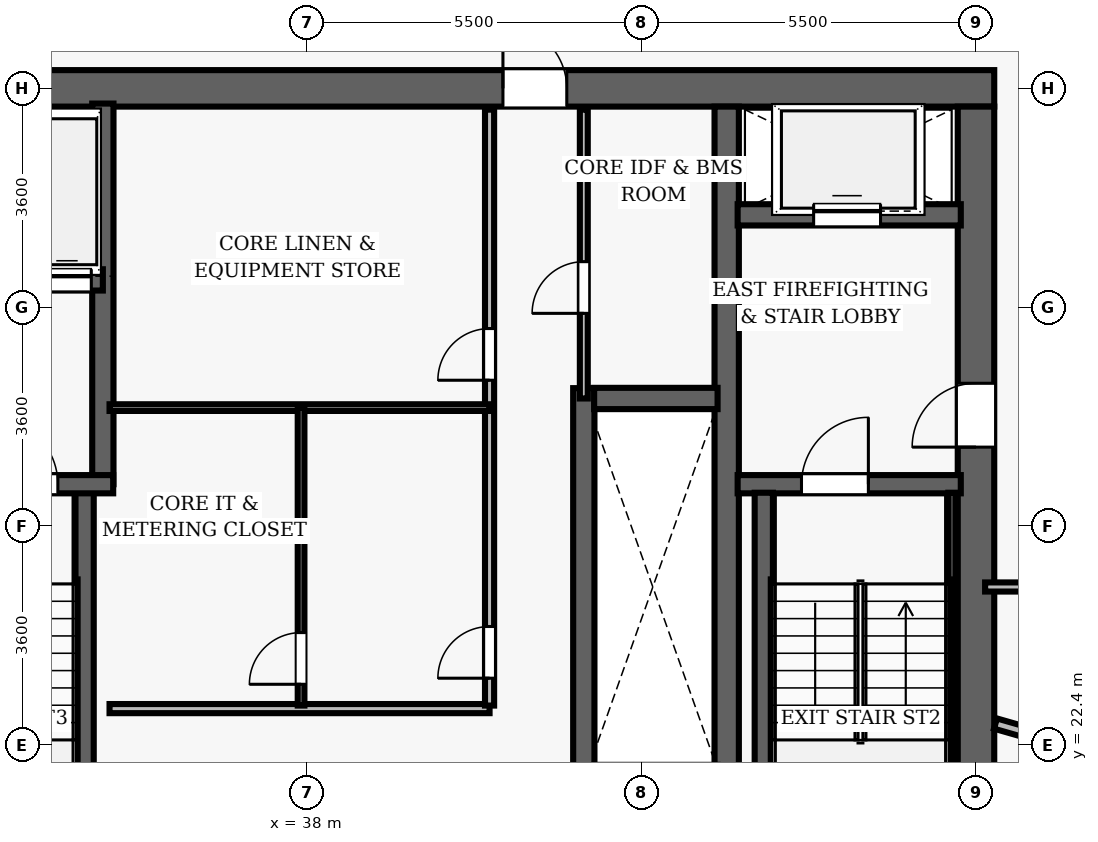
"""IFC4 building model, lengths in metres.
Left out: names, types, materials, properties, quantities, classifications, styles, units other than length and angle.
Written with IfcOpenShell. Run it as: python <this file> out.ifc"""

import sys

from ifc_helpers import new_model, si_unit, direction, frame, frame_2d, origin, place, context, subcontext, project, spatial, rectangle, extrude, element, fill, save


model = new_model("IFC4")
c1 = context("Model", 3, precision=1e-05, world=origin(), true_north=direction((0.0, 1.0)))
c2 = subcontext(c1, "Body", "Model", "MODEL_VIEW")
j1 = project(units=[si_unit("LENGTHUNIT", "METRE"), si_unit("PLANEANGLEUNIT", "RADIAN")], contexts=[c1])
p1 = place(None, origin())
s1 = spatial("IfcSite", under=j1, at=p1, CompositionType="ELEMENT")
p2 = place(p1, origin())
s2 = spatial("IfcBuilding", under=s1, at=p2, CompositionType="ELEMENT")
p3 = place(p2, frame((0.0, 0.0, 144.8)))
s3 = spatial("IfcBuildingStorey", under=s2, at=p3, CompositionType="ELEMENT", Elevation=144.8)
p4 = place(p3, frame((26.7, 33.2, 0.0), z_axis=(0.0, 0.0, 1.0), x_axis=(1.0, 0.0, 0.0)))
e1 = element("IfcWall", 1, at=p4, inside=s3, PredefinedType="SHEAR", context=c2, shape_type="SweptSolid", body=[
    extrude(rectangle(XDim=22.6, YDim=0.6, at=frame_2d((11.3, 0.0))), origin(), (0.0, 0.0, 1.0), 3.5),
])
p5 = place(p4, frame((4.62, 0.0, 0.0)))
e2 = element("IfcOpeningElement", 2, at=p5, cuts=e1, PredefinedType="OPENING", context=c2, shape_type="SweptSolid", body=[
    extrude(rectangle(XDim=1.05, YDim=2.15, at=frame_2d((0.525, 1.075))), frame((0.0, 0.31, 0.0), z_axis=(0.0, -1.0, 0.0), x_axis=(1.0, 0.0, 0.0)), (0.0, 0.0, 1.0), 0.62),
])
p6 = place(p4, frame((14.52, 0.0, 0.0)))
e3 = element("IfcOpeningElement", 3, at=p6, cuts=e1, PredefinedType="OPENING", context=c2, shape_type="SweptSolid", body=[
    extrude(rectangle(XDim=1.05, YDim=2.15, at=frame_2d((0.525, 1.075))), frame((0.0, 0.31, 0.0), z_axis=(0.0, -1.0, 0.0), x_axis=(1.0, 0.0, 0.0)), (0.0, 0.0, 1.0), 0.62),
])
p7 = place(p3, frame((49.0, 19.1, 0.0), z_axis=(0.0, 0.0, 1.0), x_axis=(0.0, 1.0, 0.0)))
e4 = element("IfcWall", 4, at=p7, inside=s3, PredefinedType="SHEAR", context=c2, shape_type="SweptSolid", body=[
    extrude(rectangle(XDim=13.8, YDim=0.6, at=frame_2d((6.9, 0.0))), origin(), (0.0, 0.0, 1.0), 3.5),
])
p8 = place(p7, frame((8.2, 0.0, 0.0)))
e5 = element("IfcOpeningElement", 5, at=p8, cuts=e4, PredefinedType="OPENING", context=c2, shape_type="SweptSolid", body=[
    extrude(rectangle(XDim=1.05, YDim=2.15, at=frame_2d((0.525, 1.075))), frame((0.0, 0.31, 0.0), z_axis=(0.0, -1.0, 0.0), x_axis=(1.0, 0.0, 0.0)), (0.0, 0.0, 1.0), 0.62),
])
p9 = place(p3, frame((44.9, 19.1, 0.0), z_axis=(0.0, 0.0, 1.0), x_axis=(0.0, 1.0, 0.0)))
e6 = element("IfcWall", 6, at=p9, inside=s3, PredefinedType="SHEAR", context=c2, shape_type="SweptSolid", body=[
    extrude(rectangle(XDim=13.8, YDim=0.4, at=frame_2d((6.9, 0.0))), origin(), (0.0, 0.0, 1.0), 3.5),
])
p10 = place(p3, frame((45.08, 26.69, 0.0), z_axis=(0.0, 0.0, 1.0), x_axis=(1.0, 0.0, 0.0)))
e7 = element("IfcWall", 7, at=p10, inside=s3, PredefinedType="SHEAR", context=c2, shape_type="SweptSolid", body=[
    extrude(rectangle(XDim=3.67, YDim=0.3, at=frame_2d((1.835, 0.0))), origin(), (0.0, 0.0, 1.0), 3.5),
])
p11 = place(p10, frame((1.05, 0.0, 0.0)))
e8 = element("IfcOpeningElement", 8, at=p11, cuts=e7, PredefinedType="OPENING", context=c2, shape_type="SweptSolid", body=[
    extrude(rectangle(XDim=1.1, YDim=2.15, at=frame_2d((0.55, 1.075))), frame((0.0, 0.16, 0.0), z_axis=(0.0, -1.0, 0.0), x_axis=(1.0, 0.0, 0.0)), (0.0, 0.0, 1.0), 0.32),
])
p12 = place(p3, frame((45.51, 19.05, 0.0), z_axis=(0.0, 0.0, 1.0), x_axis=(0.0, 1.0, 0.0)))
e9 = element("IfcWall", 9, at=p12, inside=s3, PredefinedType="SHEAR", context=c2, shape_type="SweptSolid", body=[
    extrude(rectangle(XDim=7.5, YDim=0.3, at=frame_2d((3.75, 0.0))), origin(), (0.0, 0.0, 1.0), 3.5),
])
p13 = place(p3, frame((48.605, 19.1, 0.0), z_axis=(0.0, 0.0, 1.0), x_axis=(0.0, 1.0, 0.0)))
e10 = element("IfcWall", 10, at=p13, inside=s3, PredefinedType="SHEAR", context=c2, shape_type="SweptSolid", body=[
    extrude(rectangle(XDim=7.45, YDim=0.12, at=frame_2d((3.725, 0.0))), origin(), (0.0, 0.0, 1.0), 3.5),
])
p14 = place(p3, frame((45.08, 31.12, 0.0), z_axis=(0.0, 0.0, 1.0), x_axis=(1.0, 0.0, 0.0)))
e11 = element("IfcWall", 11, at=p14, inside=s3, PredefinedType="SHEAR", context=c2, shape_type="SweptSolid", body=[
    extrude(rectangle(XDim=3.67, YDim=0.35, at=frame_2d((1.835, 0.0))), origin(), (0.0, 0.0, 1.0), 2.675),
])
p15 = place(p14, frame((1.25, 0.0, 0.0)))
e12 = element("IfcOpeningElement", 12, at=p15, cuts=e11, PredefinedType="OPENING", context=c2, shape_type="SweptSolid", body=[
    extrude(rectangle(XDim=1.1, YDim=2.15, at=frame_2d((0.55, 1.075))), frame((0.0, 0.185, 0.0), z_axis=(0.0, -1.0, 0.0), x_axis=(1.0, 0.0, 0.0)), (0.0, 0.0, 1.0), 0.37),
])
p16 = place(p3, frame((34.34, 19.05, 0.0), z_axis=(0.0, 0.0, 1.0), x_axis=(0.0, 1.0, 0.0)))
e13 = element("IfcWall", 13, at=p16, inside=s3, PredefinedType="SHEAR", context=c2, shape_type="SweptSolid", body=[
    extrude(rectangle(XDim=7.5, YDim=0.3, at=frame_2d((3.75, 0.0))), origin(), (0.0, 0.0, 1.0), 3.5),
])
p17 = place(p3, frame((34.64, 26.69, 0.0), z_axis=(0.0, 0.0, 1.0), x_axis=(0.0, 1.0, 0.0)))
e14 = element("IfcWall", 14, at=p17, inside=s3, PredefinedType="SHEAR", context=c2, shape_type="SweptSolid", body=[
    extrude(rectangle(XDim=6.26, YDim=0.35, at=frame_2d((3.13, 0.0))), origin(), (0.0, 0.0, 1.0), 3.5),
])
p18 = place(p3, frame((31.25, 26.69, 0.0), z_axis=(0.0, 0.0, 1.0), x_axis=(1.0, 0.0, 0.0)))
e15 = element("IfcWall", 15, at=p18, inside=s3, PredefinedType="SHEAR", context=c2, shape_type="SweptSolid", body=[
    extrude(rectangle(XDim=3.56, YDim=0.3, at=frame_2d((1.78, 0.0))), origin(), (0.0, 0.0, 1.0), 3.5),
])
p19 = place(p18, frame((1.55, 0.0, 0.0)))
e16 = element("IfcOpeningElement", 16, at=p19, cuts=e15, PredefinedType="OPENING", context=c2, shape_type="SweptSolid", body=[
    extrude(rectangle(XDim=1.1, YDim=2.15, at=frame_2d((0.55, 1.075))), frame((0.0, 0.16, 0.0), z_axis=(0.0, -1.0, 0.0), x_axis=(1.0, 0.0, 0.0)), (0.0, 0.0, 1.0), 0.32),
])
p20 = place(p3, frame((32.23, 30.05, 0.0), z_axis=(0.0, 0.0, 1.0), x_axis=(1.0, 0.0, 0.0)))
e17 = element("IfcWall", 17, at=p20, inside=s3, PredefinedType="SHEAR", context=c2, shape_type="SweptSolid", body=[
    extrude(rectangle(XDim=2.41, YDim=0.35, at=frame_2d((1.205, 0.0))), origin(), (0.0, 0.0, 1.0), 2.675),
])
p21 = place(p20, frame((0.42, 0.0, 0.0)))
e18 = element("IfcOpeningElement", 18, at=p21, cuts=e17, PredefinedType="OPENING", context=c2, shape_type="SweptSolid", body=[
    extrude(rectangle(XDim=0.8, YDim=2.15, at=frame_2d((0.4, 1.075))), frame((0.0, 0.185, 0.0), z_axis=(0.0, -1.0, 0.0), x_axis=(1.0, 0.0, 0.0)), (0.0, 0.0, 1.0), 0.37),
])
p22 = place(p20, frame((1.42, 0.0, 0.0)))
e19 = element("IfcOpeningElement", 19, at=p22, cuts=e17, PredefinedType="OPENING", context=c2, shape_type="SweptSolid", body=[
    extrude(rectangle(XDim=0.8, YDim=2.15, at=frame_2d((0.4, 1.075))), frame((0.0, 0.185, 0.0), z_axis=(0.0, -1.0, 0.0), x_axis=(1.0, 0.0, 0.0)), (0.0, 0.0, 1.0), 0.37),
])
p23 = place(p3, frame((42.55, 21.73, 0.0), z_axis=(0.0, 0.0, 1.0), x_axis=(0.0, 1.0, 0.0)))
e20 = element("IfcWall", 20, at=p23, inside=s3, PredefinedType="SHEAR", context=c2, shape_type="SweptSolid", body=[
    extrude(rectangle(XDim=6.54, YDim=0.35, at=frame_2d((3.27, 0.0))), origin(), (0.0, 0.0, 1.0), 2.675),
])
p24 = place(p3, frame((42.72, 28.1, 0.0), z_axis=(0.0, 0.0, 1.0), x_axis=(1.0, 0.0, 0.0)))
e21 = element("IfcWall", 21, at=p24, inside=s3, PredefinedType="SHEAR", context=c2, shape_type="SweptSolid", body=[
    extrude(rectangle(XDim=2.03, YDim=0.35, at=frame_2d((1.015, 0.0))), origin(), (0.0, 0.0, 1.0), 2.675),
])
p25 = place(p3, frame((34.75, 23.0, 0.0), z_axis=(0.0, 0.0, 1.0), x_axis=(1.0, 0.0, 0.0)))
e22 = element("IfcWall", 22, at=p25, inside=s3, PredefinedType="PARTITIONING", context=c2, shape_type="SweptSolid", body=[
    extrude(rectangle(XDim=6.25, YDim=0.15, at=frame_2d((3.125, 0.0))), origin(), (0.0, 0.0, 1.0), 2.675),
])
p26 = place(p3, frame((41.0, 23.05, 0.0), z_axis=(0.0, 0.0, 1.0), x_axis=(0.0, 1.0, 0.0)))
e23 = element("IfcWall", 23, at=p26, inside=s3, PredefinedType="PARTITIONING", context=c2, shape_type="SweptSolid", body=[
    extrude(rectangle(XDim=9.8, YDim=0.15, at=frame_2d((4.9, 0.0))), origin(), (0.0, 0.0, 1.0), 2.675),
])
p27 = place(p26, frame((5.35, 0.0, 0.0)))
e24 = element("IfcOpeningElement", 24, at=p27, cuts=e23, PredefinedType="OPENING", context=c2, shape_type="SweptSolid", body=[
    extrude(rectangle(XDim=0.85, YDim=2.1, at=frame_2d((0.425, 1.05))), frame((0.0, 0.085, 0.0), z_axis=(0.0, -1.0, 0.0), x_axis=(1.0, 0.0, 0.0)), (0.0, 0.0, 1.0), 0.17),
])
p28 = place(p26, frame((0.45, 0.0, 0.0)))
e25 = element("IfcOpeningElement", 25, at=p28, cuts=e23, PredefinedType="OPENING", context=c2, shape_type="SweptSolid", body=[
    extrude(rectangle(XDim=0.85, YDim=2.1, at=frame_2d((0.425, 1.05))), frame((0.0, 0.085, 0.0), z_axis=(0.0, -1.0, 0.0), x_axis=(1.0, 0.0, 0.0)), (0.0, 0.0, 1.0), 0.17),
])
p29 = place(p3, frame((34.75, 27.95, 0.0), z_axis=(0.0, 0.0, 1.0), x_axis=(1.0, 0.0, 0.0)))
e26 = element("IfcWall", 26, at=p29, inside=s3, PredefinedType="PARTITIONING", context=c2, shape_type="SweptSolid", body=[
    extrude(rectangle(XDim=6.25, YDim=0.11, at=frame_2d((3.125, 0.0))), origin(), (0.0, 0.0, 1.0), 2.675),
])
p30 = place(p3, frame((37.9, 23.05, 0.0), z_axis=(0.0, 0.0, 1.0), x_axis=(0.0, 1.0, 0.0)))
e27 = element("IfcWall", 27, at=p30, inside=s3, PredefinedType="PARTITIONING", context=c2, shape_type="SweptSolid", body=[
    extrude(rectangle(XDim=4.9, YDim=0.11, at=frame_2d((2.45, 0.0))), origin(), (0.0, 0.0, 1.0), 2.675),
])
p31 = place(p30, frame((0.35, 0.0, 0.0)))
e28 = element("IfcOpeningElement", 28, at=p31, cuts=e27, PredefinedType="OPENING", context=c2, shape_type="SweptSolid", body=[
    extrude(rectangle(XDim=0.85, YDim=2.1, at=frame_2d((0.425, 1.05))), frame((0.0, 0.065, 0.0), z_axis=(0.0, -1.0, 0.0), x_axis=(1.0, 0.0, 0.0)), (0.0, 0.0, 1.0), 0.13),
])
p32 = place(p3, frame((42.55, 28.1, 0.0), z_axis=(0.0, 0.0, 1.0), x_axis=(0.0, 1.0, 0.0)))
e29 = element("IfcWall", 29, at=p32, inside=s3, PredefinedType="PARTITIONING", context=c2, shape_type="SweptSolid", body=[
    extrude(rectangle(XDim=4.75, YDim=0.13, at=frame_2d((2.375, 0.0))), origin(), (0.0, 0.0, 1.0), 2.675),
])
p33 = place(p32, frame((1.4, 0.0, 0.0)))
e30 = element("IfcOpeningElement", 30, at=p33, cuts=e29, PredefinedType="OPENING", context=c2, shape_type="SweptSolid", body=[
    extrude(rectangle(XDim=0.85, YDim=2.1, at=frame_2d((0.425, 1.05))), frame((0.0, 0.075, 0.0), z_axis=(0.0, -1.0, 0.0), x_axis=(1.0, 0.0, 0.0)), (0.0, 0.0, 1.0), 0.15),
])
p34 = place(p3, frame((49.15, 25.0, 0.0), z_axis=(0.0, 0.0, 1.0), x_axis=(1.0, 0.0, 0.0)))
e31 = element("IfcWall", 31, at=p34, inside=s3, PredefinedType="PARTITIONING", context=c2, shape_type="SweptSolid", body=[
    extrude(rectangle(XDim=12.35, YDim=0.15, at=frame_2d((6.175, 0.0))), origin(), (0.0, 0.0, 1.0), 2.675),
])
p35 = place(p34, frame((2.337, 0.0, 0.0)))
e32 = element("IfcOpeningElement", 32, at=p35, cuts=e31, PredefinedType="OPENING", context=c2, shape_type="SweptSolid", body=[
    extrude(rectangle(XDim=1.5, YDim=2.2, at=frame_2d((0.75, 1.1))), frame((0.0, 0.085, 0.0), z_axis=(0.0, -1.0, 0.0), x_axis=(1.0, 0.0, 0.0)), (0.0, 0.0, 1.0), 0.17),
])
p36 = place(p3, frame((49.32, 22.754, 0.0), z_axis=(0.0, 0.0, 1.0), x_axis=(0.961264573676, -0.275627319757, 0.0)))
e33 = element("IfcWall", 33, at=p36, inside=s3, PredefinedType="PARTITIONING", context=c2, shape_type="SweptSolid", body=[
    extrude(rectangle(XDim=17.931, YDim=0.175, at=frame_2d((8.966, 0.0))), origin(), (0.0, 0.0, 1.0), 2.675),
])
p37 = place(p11, origin())
e34 = element("IfcDoor", 34, at=p37, inside=s3, OperationType="SINGLE_SWING_RIGHT", PredefinedType="DOOR", context=c2, shape_type="SweptSolid", body=[
    extrude(rectangle(XDim=1.1, YDim=2.15, at=frame_2d((0.55, 1.075))), frame((0.0, 0.025, 0.0), z_axis=(0.0, -1.0, 0.0), x_axis=(1.0, 0.0, 0.0)), (0.0, 0.0, 1.0), 0.05),
])
fill(e8, e34)
p38 = place(p8, origin())
e35 = element("IfcDoor", 35, at=p38, inside=s3, OperationType="SINGLE_SWING_LEFT", PredefinedType="DOOR", context=c2, shape_type="SweptSolid", body=[
    extrude(rectangle(XDim=1.05, YDim=2.15, at=frame_2d((0.525, 1.075))), frame((0.0, 0.025, 0.0), z_axis=(0.0, -1.0, 0.0), x_axis=(1.0, 0.0, 0.0)), (0.0, 0.0, 1.0), 0.05),
])
fill(e5, e35)
p39 = place(p19, origin())
e36 = element("IfcDoor", 36, at=p39, inside=s3, OperationType="SINGLE_SWING_LEFT", PredefinedType="DOOR", context=c2, shape_type="SweptSolid", body=[
    extrude(rectangle(XDim=1.1, YDim=2.15, at=frame_2d((0.55, 1.075))), frame((0.0, 0.025, 0.0), z_axis=(0.0, -1.0, 0.0), x_axis=(1.0, 0.0, 0.0)), (0.0, 0.0, 1.0), 0.05),
])
fill(e16, e36)
p40 = place(p6, origin())
e37 = element("IfcDoor", 37, at=p40, inside=s3, OperationType="SINGLE_SWING_LEFT", PredefinedType="DOOR", context=c2, shape_type="SweptSolid", body=[
    extrude(rectangle(XDim=1.05, YDim=2.15, at=frame_2d((0.525, 1.075))), frame((0.0, 0.025, 0.0), z_axis=(0.0, -1.0, 0.0), x_axis=(1.0, 0.0, 0.0)), (0.0, 0.0, 1.0), 0.05),
])
fill(e3, e37)
p41 = place(p27, origin())
e38 = element("IfcDoor", 38, at=p41, inside=s3, OperationType="SINGLE_SWING_LEFT", PredefinedType="DOOR", context=c2, shape_type="SweptSolid", body=[
    extrude(rectangle(XDim=0.85, YDim=2.1, at=frame_2d((0.425, 1.05))), frame((0.0, 0.025, 0.0), z_axis=(0.0, -1.0, 0.0), x_axis=(1.0, 0.0, 0.0)), (0.0, 0.0, 1.0), 0.05),
])
fill(e24, e38)
p42 = place(p28, origin())
e39 = element("IfcDoor", 39, at=p42, inside=s3, OperationType="SINGLE_SWING_LEFT", PredefinedType="DOOR", context=c2, shape_type="SweptSolid", body=[
    extrude(rectangle(XDim=0.85, YDim=2.1, at=frame_2d((0.425, 1.05))), frame((0.0, 0.025, 0.0), z_axis=(0.0, -1.0, 0.0), x_axis=(1.0, 0.0, 0.0)), (0.0, 0.0, 1.0), 0.05),
])
fill(e25, e39)
p43 = place(p31, origin())
e40 = element("IfcDoor", 40, at=p43, inside=s3, OperationType="SINGLE_SWING_LEFT", PredefinedType="DOOR", context=c2, shape_type="SweptSolid", body=[
    extrude(rectangle(XDim=0.85, YDim=2.1, at=frame_2d((0.425, 1.05))), frame((0.0, 0.025, 0.0), z_axis=(0.0, -1.0, 0.0), x_axis=(1.0, 0.0, 0.0)), (0.0, 0.0, 1.0), 0.05),
])
fill(e28, e40)
p44 = place(p33, origin())
e41 = element("IfcDoor", 41, at=p44, inside=s3, OperationType="SINGLE_SWING_LEFT", PredefinedType="DOOR", context=c2, shape_type="SweptSolid", body=[
    extrude(rectangle(XDim=0.85, YDim=2.1, at=frame_2d((0.425, 1.05))), frame((0.0, 0.025, 0.0), z_axis=(0.0, -1.0, 0.0), x_axis=(1.0, 0.0, 0.0)), (0.0, 0.0, 1.0), 0.05),
])
fill(e30, e41)
p45 = place(p15, origin())
e42 = element("IfcDoor", 42, at=p45, inside=s3, OperationType="SLIDING_TO_LEFT", PredefinedType="DOOR", context=c2, shape_type="SweptSolid", body=[
    extrude(rectangle(XDim=1.1, YDim=2.15, at=frame_2d((0.55, 1.075))), frame((0.0, 0.025, 0.0), z_axis=(0.0, -1.0, 0.0), x_axis=(1.0, 0.0, 0.0)), (0.0, 0.0, 1.0), 0.05),
])
fill(e12, e42)
p46 = place(p22, origin())
e43 = element("IfcDoor", 43, at=p46, inside=s3, OperationType="SLIDING_TO_LEFT", PredefinedType="DOOR", context=c2, shape_type="SweptSolid", body=[
    extrude(rectangle(XDim=0.8, YDim=2.15, at=frame_2d((0.4, 1.075))), frame((0.0, 0.025, 0.0), z_axis=(0.0, -1.0, 0.0), x_axis=(1.0, 0.0, 0.0)), (0.0, 0.0, 1.0), 0.05),
])
fill(e19, e43)
save(model, sys.argv[1])
